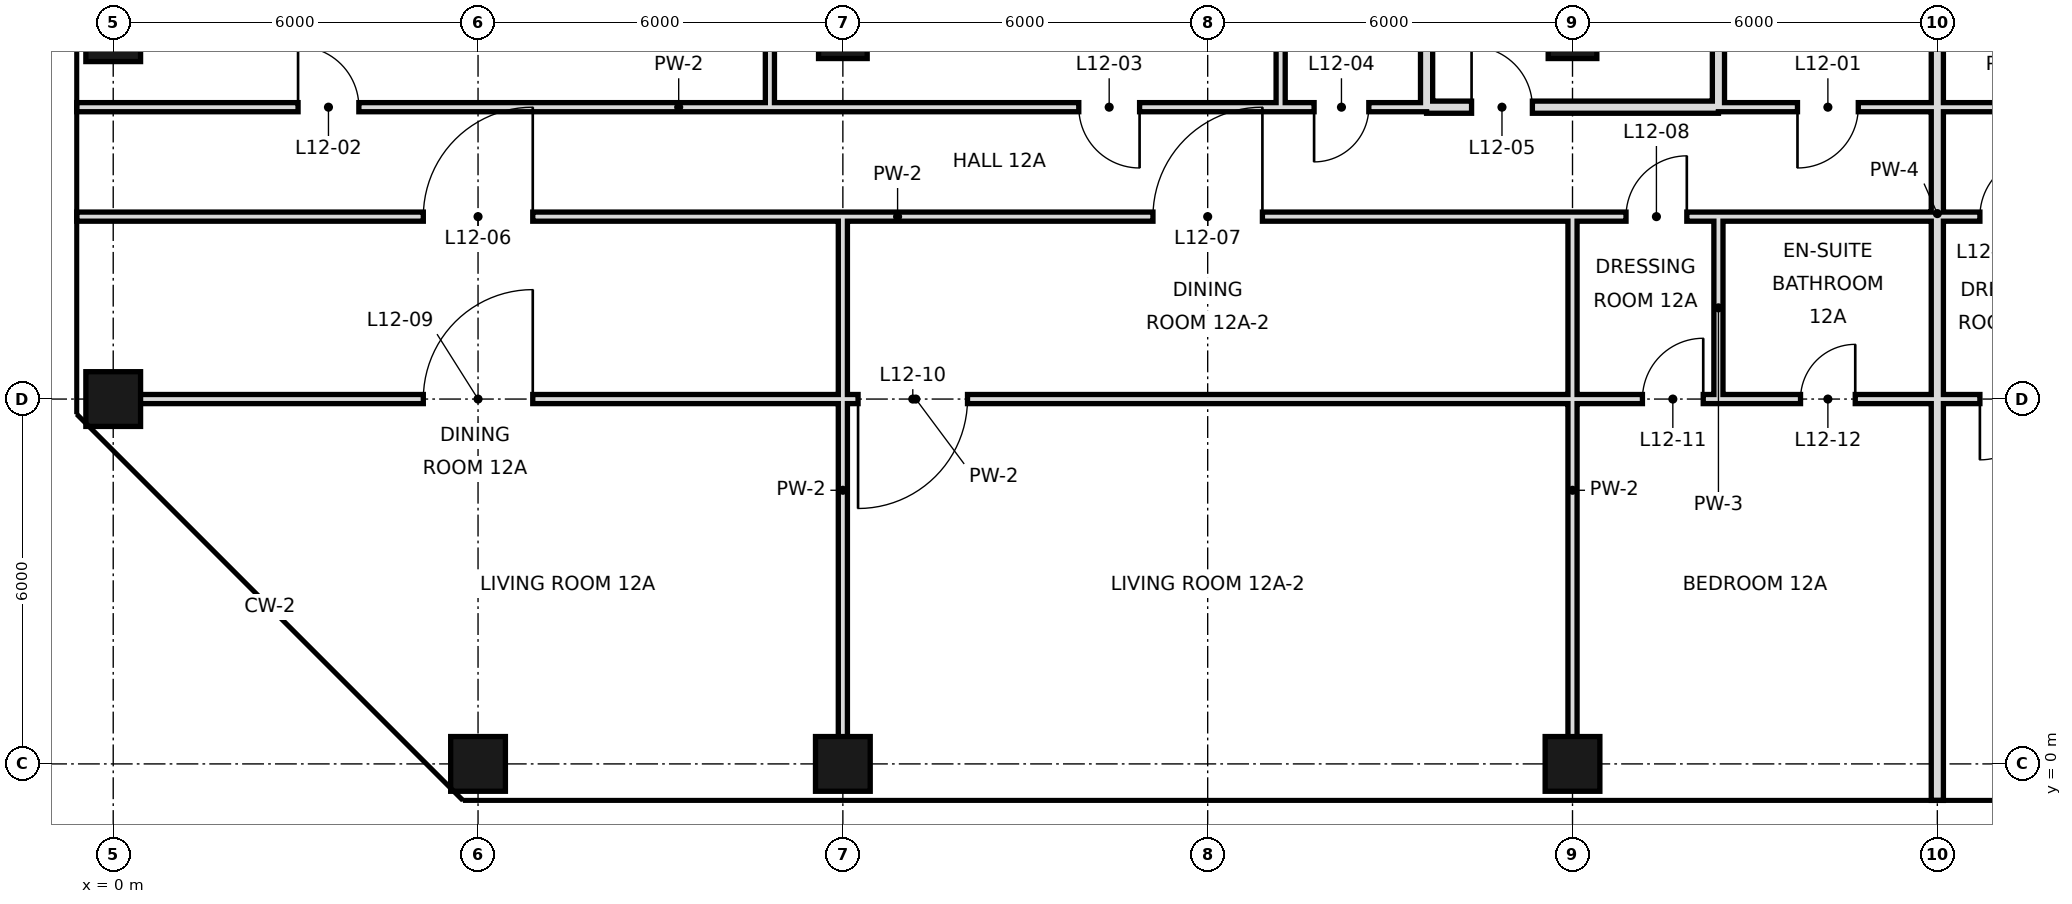
"""IFC4 building model, lengths in metres.
Left out: names, types, materials, properties, quantities, classifications, styles, units other than length and angle.
Written with IfcOpenShell. Run it as: python <this file> out.ifc"""

import sys

from ifc_helpers import new_model, si_unit, direction, frame, frame_2d, origin, origin_2d, place, context, subcontext, project, spatial, rectangle, hollow_rectangle, extrude, element, fill, save


model = new_model("IFC4")
c1 = context("Model", 3, precision=1e-05, world=origin(), true_north=direction((0.0, 1.0)))
c2 = subcontext(c1, "Body", "Model", "MODEL_VIEW")
j1 = project(units=[si_unit("LENGTHUNIT", "METRE"), si_unit("PLANEANGLEUNIT", "RADIAN")], contexts=[c1])
p1 = place(None, origin())
s1 = spatial("IfcSite", under=j1, at=p1, CompositionType="ELEMENT")
p2 = place(p1, origin())
s2 = spatial("IfcBuilding", under=s1, at=p2, CompositionType="ELEMENT")
p3 = place(p2, frame((0.0, 0.0, 64.2)))
s3 = spatial("IfcBuildingStorey", under=s2, at=p3, CompositionType="ELEMENT", Elevation=64.2)
for number, where, z_axis, x_axis in (
    (1, (0.0, 6.0, 0.0), (0.0, 0.0, 1.0), (1.0, 0.0, 0.0)),
    (2, (0.0, 12.0, 0.0), (0.0, 0.0, 1.0), (1.0, 0.0, 0.0)),
    (3, (6.0, 0.0, 0.0), (0.0, 0.0, 1.0), (1.0, 0.0, 0.0)),
    (4, (12.0, 0.0, 0.0), (0.0, 0.0, 1.0), (1.0, 0.0, 0.0)),
):
    element("IfcColumn", number, at=place(p3, frame(where, z_axis=z_axis, x_axis=x_axis)), inside=s3, PredefinedType="COLUMN", context=c2, shape_type="SweptSolid", body=[
        extrude(hollow_rectangle(XDim=0.9, YDim=0.9, WallThickness=0.045, at=origin_2d()), origin(), (0.0, 0.0, 1.0), 3.6),
    ])
p4 = place(p3, frame((12.0, 12.0, 0.0), z_axis=(0.0, 0.0, 1.0), x_axis=(1.0, 0.0, 0.0)))
e5 = element("IfcColumn", 5, at=p4, inside=s3, PredefinedType="COLUMN", context=c2, shape_type="SweptSolid", body=[
    extrude(hollow_rectangle(XDim=0.8, YDim=0.8, WallThickness=0.04, at=origin_2d()), origin(), (0.0, 0.0, 1.0), 3.6),
])
p5 = place(p3, frame((24.0, 0.0, 0.0), z_axis=(0.0, 0.0, 1.0), x_axis=(1.0, 0.0, 0.0)))
e6 = element("IfcColumn", 6, at=p5, inside=s3, PredefinedType="COLUMN", context=c2, shape_type="SweptSolid", body=[
    extrude(hollow_rectangle(XDim=0.9, YDim=0.9, WallThickness=0.045, at=origin_2d()), origin(), (0.0, 0.0, 1.0), 3.6),
])
p6 = place(p3, frame((24.0, 12.0, 0.0), z_axis=(0.0, 0.0, 1.0), x_axis=(1.0, 0.0, 0.0)))
e7 = element("IfcColumn", 7, at=p6, inside=s3, PredefinedType="COLUMN", context=c2, shape_type="SweptSolid", body=[
    extrude(hollow_rectangle(XDim=0.8, YDim=0.8, WallThickness=0.04, at=origin_2d()), origin(), (0.0, 0.0, 1.0), 3.6),
])
p7 = place(p3, frame((10.8, 10.8, 0.0), z_axis=(0.0, 0.0, 1.0), x_axis=(0.0, 1.0, 0.0)))
e8 = element("IfcWall", 8, at=p7, inside=s3, PredefinedType="PARTITIONING", context=c2, shape_type="SweptSolid", body=[
    extrude(rectangle(XDim=7.9, YDim=0.15, at=frame_2d((3.95, 0.0))), origin(), (0.0, 0.0, 1.0), 3.42),
])
p8 = place(p3, frame((12.0, 0.0, 0.0), z_axis=(0.0, 0.0, 1.0), x_axis=(0.0, 1.0, 0.0)))
e9 = element("IfcWall", 9, at=p8, inside=s3, PredefinedType="PARTITIONING", context=c2, shape_type="SweptSolid", body=[
    extrude(rectangle(XDim=9.0, YDim=0.15, at=frame_2d((4.5, 0.0))), origin(), (0.0, 0.0, 1.0), 2.72),
])
p9 = place(p3, frame((19.2, 10.8, 0.0), z_axis=(0.0, 0.0, 1.0), x_axis=(0.0, 1.0, 0.0)))
e10 = element("IfcWall", 10, at=p9, inside=s3, PredefinedType="PARTITIONING", context=c2, shape_type="SweptSolid", body=[
    extrude(rectangle(XDim=7.9, YDim=0.15, at=frame_2d((3.95, 0.0))), origin(), (0.0, 0.0, 1.0), 3.42),
])
p10 = place(p3, frame((21.6, 10.8, 0.0), z_axis=(0.0, 0.0, 1.0), x_axis=(0.0, 1.0, 0.0)))
e11 = element("IfcWall", 11, at=p10, inside=s3, PredefinedType="SOLIDWALL", context=c2, shape_type="SweptSolid", body=[
    extrude(rectangle(XDim=7.9, YDim=0.2, at=frame_2d((3.95, 0.0))), origin(), (0.0, 0.0, 1.0), 2.72),
])
p11 = place(p3, frame((24.0, 0.0, 0.0), z_axis=(0.0, 0.0, 1.0), x_axis=(0.0, 1.0, 0.0)))
e12 = element("IfcWall", 12, at=p11, inside=s3, PredefinedType="PARTITIONING", context=c2, shape_type="SweptSolid", body=[
    extrude(rectangle(XDim=9.0, YDim=0.15, at=frame_2d((4.5, 0.0))), origin(), (0.0, 0.0, 1.0), 2.72),
])
p12 = place(p3, frame((26.4, 10.8, 0.0), z_axis=(0.0, 0.0, 1.0), x_axis=(0.0, 1.0, 0.0)))
e13 = element("IfcWall", 13, at=p12, inside=s3, PredefinedType="SOLIDWALL", context=c2, shape_type="SweptSolid", body=[
    extrude(rectangle(XDim=7.9, YDim=0.2, at=frame_2d((3.95, 0.0))), origin(), (0.0, 0.0, 1.0), 2.72),
])
p13 = place(p3, frame((26.4, 6.0, 0.0), z_axis=(0.0, 0.0, 1.0), x_axis=(0.0, 1.0, 0.0)))
e14 = element("IfcWall", 14, at=p13, inside=s3, PredefinedType="PARTITIONING", context=c2, shape_type="SweptSolid", body=[
    extrude(rectangle(XDim=3.0, YDim=0.15, at=frame_2d((1.5, 0.0))), origin(), (0.0, 0.0, 1.0), 3.42),
])
p14 = place(p3, frame((30.0, -0.6, 0.0), z_axis=(0.0, 0.0, 1.0), x_axis=(0.0, 1.0, 0.0)))
e15 = element("IfcWall", 15, at=p14, inside=s3, PredefinedType="SOLIDWALL", context=c2, shape_type="SweptSolid", body=[
    extrude(rectangle(XDim=19.3, YDim=0.2, at=frame_2d((9.65, 0.0))), origin(), (0.0, 0.0, 1.0), 2.72),
])
p15 = place(p3, frame((21.6, 10.8, 0.0), z_axis=(0.0, 0.0, 1.0), x_axis=(1.0, 0.0, 0.0)))
e16 = element("IfcWall", 16, at=p15, inside=s3, PredefinedType="SOLIDWALL", context=c2, shape_type="SweptSolid", body=[
    extrude(rectangle(XDim=4.8, YDim=0.2, at=frame_2d((2.4, 0.0))), origin(), (0.0, 0.0, 1.0), 2.72),
])
p16 = place(p15, frame((0.74, 0.0, 0.0)))
e17 = element("IfcOpeningElement", 17, at=p16, cuts=e16, PredefinedType="OPENING", context=c2, shape_type="SweptSolid", body=[
    extrude(rectangle(XDim=1.0, YDim=2.4, at=frame_2d((0.5, 1.2))), frame((0.0, 0.11, 0.0), z_axis=(0.0, -1.0, 0.0), x_axis=(1.0, 0.0, 0.0)), (0.0, 0.0, 1.0), 0.22),
])
p17 = place(p3, frame((-0.6, 10.8, 0.0), z_axis=(0.0, 0.0, 1.0), x_axis=(1.0, 0.0, 0.0)))
e18 = element("IfcWall", 18, at=p17, inside=s3, PredefinedType="PARTITIONING", context=c2, shape_type="SweptSolid", body=[
    extrude(rectangle(XDim=19.8, YDim=0.15, at=frame_2d((9.9, 0.0))), origin(), (0.0, 0.0, 1.0), 3.42),
])
p18 = place(p17, frame((3.64, 0.0, 0.0)))
e19 = element("IfcOpeningElement", 19, at=p18, cuts=e18, PredefinedType="OPENING", context=c2, shape_type="SweptSolid", body=[
    extrude(rectangle(XDim=1.0, YDim=2.4, at=frame_2d((0.5, 1.2))), frame((0.0, 0.085, 0.0), z_axis=(0.0, -1.0, 0.0), x_axis=(1.0, 0.0, 0.0)), (0.0, 0.0, 1.0), 0.17),
])
p19 = place(p17, frame((16.48, 0.0, 0.0)))
e20 = element("IfcOpeningElement", 20, at=p19, cuts=e18, PredefinedType="OPENING", context=c2, shape_type="SweptSolid", body=[
    extrude(rectangle(XDim=1.0, YDim=2.4, at=frame_2d((0.5, 1.2))), frame((0.0, 0.085, 0.0), z_axis=(0.0, -1.0, 0.0), x_axis=(1.0, 0.0, 0.0)), (0.0, 0.0, 1.0), 0.17),
])
p20 = place(p3, frame((26.4, 10.8, 0.0), z_axis=(0.0, 0.0, 1.0), x_axis=(1.0, 0.0, 0.0)))
e21 = element("IfcWall", 21, at=p20, inside=s3, PredefinedType="PARTITIONING", context=c2, shape_type="SweptSolid", body=[
    extrude(rectangle(XDim=9.6, YDim=0.15, at=frame_2d((4.8, 0.0))), origin(), (0.0, 0.0, 1.0), 3.42),
])
p21 = place(p20, frame((1.3, 0.0, 0.0)))
e22 = element("IfcOpeningElement", 22, at=p21, cuts=e21, PredefinedType="OPENING", context=c2, shape_type="SweptSolid", body=[
    extrude(rectangle(XDim=1.0, YDim=2.4, at=frame_2d((0.5, 1.2))), frame((0.0, 0.085, 0.0), z_axis=(0.0, -1.0, 0.0), x_axis=(1.0, 0.0, 0.0)), (0.0, 0.0, 1.0), 0.17),
])
p22 = place(p20, frame((7.0, 0.0, 0.0)))
e23 = element("IfcOpeningElement", 23, at=p22, cuts=e21, PredefinedType="OPENING", context=c2, shape_type="SweptSolid", body=[
    extrude(rectangle(XDim=1.0, YDim=2.4, at=frame_2d((0.5, 1.2))), frame((0.0, 0.085, 0.0), z_axis=(0.0, -1.0, 0.0), x_axis=(1.0, 0.0, 0.0)), (0.0, 0.0, 1.0), 0.17),
])
p23 = place(p3, frame((19.2, 10.8, 0.0), z_axis=(0.0, 0.0, 1.0), x_axis=(1.0, 0.0, 0.0)))
e24 = element("IfcWall", 24, at=p23, inside=s3, PredefinedType="PARTITIONING", context=c2, shape_type="SweptSolid", body=[
    extrude(rectangle(XDim=2.4, YDim=0.15, at=frame_2d((1.2, 0.0))), origin(), (0.0, 0.0, 1.0), 3.42),
])
p24 = place(p23, frame((0.55, 0.0, 0.0)))
e25 = element("IfcOpeningElement", 25, at=p24, cuts=e24, PredefinedType="OPENING", context=c2, shape_type="SweptSolid", body=[
    extrude(rectangle(XDim=0.9, YDim=2.4, at=frame_2d((0.45, 1.2))), frame((0.0, 0.085, 0.0), z_axis=(0.0, -1.0, 0.0), x_axis=(1.0, 0.0, 0.0)), (0.0, 0.0, 1.0), 0.17),
])
p25 = place(p3, frame((0.0, 6.0, 0.0), z_axis=(0.0, 0.0, 1.0), x_axis=(1.0, 0.0, 0.0)))
e26 = element("IfcWall", 26, at=p25, inside=s3, PredefinedType="PARTITIONING", context=c2, shape_type="SweptSolid", body=[
    extrude(rectangle(XDim=26.4, YDim=0.15, at=frame_2d((13.2, 0.0))), origin(), (0.0, 0.0, 1.0), 2.97),
])
p26 = place(p25, frame((5.1, 0.0, 0.0)))
e27 = element("IfcOpeningElement", 27, at=p26, cuts=e26, PredefinedType="OPENING", context=c2, shape_type="SweptSolid", body=[
    extrude(rectangle(XDim=1.8, YDim=2.4, at=frame_2d((0.9, 1.2))), frame((0.0, 0.085, 0.0), z_axis=(0.0, -1.0, 0.0), x_axis=(1.0, 0.0, 0.0)), (0.0, 0.0, 1.0), 0.17),
])
p27 = place(p25, frame((12.25, 0.0, 0.0)))
e28 = element("IfcOpeningElement", 28, at=p27, cuts=e26, PredefinedType="OPENING", context=c2, shape_type="SweptSolid", body=[
    extrude(rectangle(XDim=1.8, YDim=2.4, at=frame_2d((0.9, 1.2))), frame((0.0, 0.085, 0.0), z_axis=(0.0, -1.0, 0.0), x_axis=(1.0, 0.0, 0.0)), (0.0, 0.0, 1.0), 0.17),
])
p28 = place(p25, frame((25.15, 0.0, 0.0)))
e29 = element("IfcOpeningElement", 29, at=p28, cuts=e26, PredefinedType="OPENING", context=c2, shape_type="SweptSolid", body=[
    extrude(rectangle(XDim=1.0, YDim=2.4, at=frame_2d((0.5, 1.2))), frame((0.0, 0.085, 0.0), z_axis=(0.0, -1.0, 0.0), x_axis=(1.0, 0.0, 0.0)), (0.0, 0.0, 1.0), 0.17),
])
p29 = place(p3, frame((30.0, 6.0, 0.0), z_axis=(0.0, 0.0, 1.0), x_axis=(1.0, 0.0, 0.0)))
e30 = element("IfcWall", 30, at=p29, inside=s3, PredefinedType="PARTITIONING", context=c2, shape_type="SweptSolid", body=[
    extrude(rectangle(XDim=2.4, YDim=0.15, at=frame_2d((1.2, 0.0))), origin(), (0.0, 0.0, 1.0), 2.97),
])
p30 = place(p29, frame((0.7, 0.0, 0.0)))
e31 = element("IfcOpeningElement", 31, at=p30, cuts=e30, PredefinedType="OPENING", context=c2, shape_type="SweptSolid", body=[
    extrude(rectangle(XDim=1.0, YDim=2.4, at=frame_2d((0.5, 1.2))), frame((0.0, 0.085, 0.0), z_axis=(0.0, -1.0, 0.0), x_axis=(1.0, 0.0, 0.0)), (0.0, 0.0, 1.0), 0.17),
])
p31 = place(p3, frame((26.4, 6.0, 0.0), z_axis=(0.0, 0.0, 1.0), x_axis=(1.0, 0.0, 0.0)))
e32 = element("IfcWall", 32, at=p31, inside=s3, PredefinedType="PARTITIONING", context=c2, shape_type="SweptSolid", body=[
    extrude(rectangle(XDim=3.6, YDim=0.15, at=frame_2d((1.8, 0.0))), origin(), (0.0, 0.0, 1.0), 2.97),
])
p32 = place(p31, frame((1.35, 0.0, 0.0)))
e33 = element("IfcOpeningElement", 33, at=p32, cuts=e32, PredefinedType="OPENING", context=c2, shape_type="SweptSolid", body=[
    extrude(rectangle(XDim=0.9, YDim=2.4, at=frame_2d((0.45, 1.2))), frame((0.0, 0.085, 0.0), z_axis=(0.0, -1.0, 0.0), x_axis=(1.0, 0.0, 0.0)), (0.0, 0.0, 1.0), 0.17),
])
p33 = place(p3, frame((-0.6, 9.0, 0.0), z_axis=(0.0, 0.0, 1.0), x_axis=(1.0, 0.0, 0.0)))
e34 = element("IfcWall", 34, at=p33, inside=s3, PredefinedType="PARTITIONING", context=c2, shape_type="SweptSolid", body=[
    extrude(rectangle(XDim=27.0, YDim=0.15, at=frame_2d((13.5, 0.0))), origin(), (0.0, 0.0, 1.0), 3.42),
])
p34 = place(p33, frame((5.7, 0.0, 0.0)))
e35 = element("IfcOpeningElement", 35, at=p34, cuts=e34, PredefinedType="OPENING", context=c2, shape_type="SweptSolid", body=[
    extrude(rectangle(XDim=1.8, YDim=2.4, at=frame_2d((0.9, 1.2))), frame((0.0, 0.085, 0.0), z_axis=(0.0, -1.0, 0.0), x_axis=(1.0, 0.0, 0.0)), (0.0, 0.0, 1.0), 0.17),
])
p35 = place(p33, frame((17.7, 0.0, 0.0)))
e36 = element("IfcOpeningElement", 36, at=p35, cuts=e34, PredefinedType="OPENING", context=c2, shape_type="SweptSolid", body=[
    extrude(rectangle(XDim=1.8, YDim=2.4, at=frame_2d((0.9, 1.2))), frame((0.0, 0.085, 0.0), z_axis=(0.0, -1.0, 0.0), x_axis=(1.0, 0.0, 0.0)), (0.0, 0.0, 1.0), 0.17),
])
p36 = place(p33, frame((25.48, 0.0, 0.0)))
e37 = element("IfcOpeningElement", 37, at=p36, cuts=e34, PredefinedType="OPENING", context=c2, shape_type="SweptSolid", body=[
    extrude(rectangle(XDim=1.0, YDim=2.4, at=frame_2d((0.5, 1.2))), frame((0.0, 0.085, 0.0), z_axis=(0.0, -1.0, 0.0), x_axis=(1.0, 0.0, 0.0)), (0.0, 0.0, 1.0), 0.17),
])
p37 = place(p3, frame((30.0, 9.0, 0.0), z_axis=(0.0, 0.0, 1.0), x_axis=(1.0, 0.0, 0.0)))
e38 = element("IfcWall", 38, at=p37, inside=s3, PredefinedType="PARTITIONING", context=c2, shape_type="SweptSolid", body=[
    extrude(rectangle(XDim=2.4, YDim=0.15, at=frame_2d((1.2, 0.0))), origin(), (0.0, 0.0, 1.0), 3.42),
])
p38 = place(p37, frame((0.7, 0.0, 0.0)))
e39 = element("IfcOpeningElement", 39, at=p38, cuts=e38, PredefinedType="OPENING", context=c2, shape_type="SweptSolid", body=[
    extrude(rectangle(XDim=1.0, YDim=2.4, at=frame_2d((0.5, 1.2))), frame((0.0, 0.085, 0.0), z_axis=(0.0, -1.0, 0.0), x_axis=(1.0, 0.0, 0.0)), (0.0, 0.0, 1.0), 0.17),
])
p39 = place(p3, frame((26.4, 9.0, 0.0), z_axis=(0.0, 0.0, 1.0), x_axis=(1.0, 0.0, 0.0)))
e40 = element("IfcWall", 40, at=p39, inside=s3, PredefinedType="PARTITIONING", context=c2, shape_type="SweptSolid", body=[
    extrude(rectangle(XDim=3.6, YDim=0.15, at=frame_2d((1.8, 0.0))), origin(), (0.0, 0.0, 1.0), 3.42),
])
p40 = place(p21, frame((1.0, 0.0, 0.0), z_axis=(0.0, 0.0, 1.0), x_axis=(-1.0, 0.0, 0.0)))
e41 = element("IfcDoor", 41, at=p40, inside=s3, OperationType="SINGLE_SWING_RIGHT", PredefinedType="DOOR", context=c2, shape_type="SweptSolid", body=[
    extrude(rectangle(XDim=1.0, YDim=2.4, at=frame_2d((0.5, 1.2))), frame((0.0, 0.025, 0.0), z_axis=(0.0, -1.0, 0.0), x_axis=(1.0, 0.0, 0.0)), (0.0, 0.0, 1.0), 0.05),
])
fill(e22, e41)
p41 = place(p18, origin())
e42 = element("IfcDoor", 42, at=p41, inside=s3, OperationType="SINGLE_SWING_LEFT", PredefinedType="DOOR", context=c2, shape_type="SweptSolid", body=[
    extrude(rectangle(XDim=1.0, YDim=2.4, at=frame_2d((0.5, 1.2))), frame((0.0, 0.025, 0.0), z_axis=(0.0, -1.0, 0.0), x_axis=(1.0, 0.0, 0.0)), (0.0, 0.0, 1.0), 0.05),
])
fill(e19, e42)
p42 = place(p19, origin())
e43 = element("IfcDoor", 43, at=p42, inside=s3, OperationType="SINGLE_SWING_RIGHT", PredefinedType="DOOR", context=c2, shape_type="SweptSolid", body=[
    extrude(rectangle(XDim=1.0, YDim=2.4, at=frame_2d((0.5, 1.2))), frame((0.0, 0.025, 0.0), z_axis=(0.0, -1.0, 0.0), x_axis=(1.0, 0.0, 0.0)), (0.0, 0.0, 1.0), 0.05),
])
fill(e20, e43)
p43 = place(p24, frame((0.9, 0.0, 0.0), z_axis=(0.0, 0.0, 1.0), x_axis=(-1.0, 0.0, 0.0)))
e44 = element("IfcDoor", 44, at=p43, inside=s3, OperationType="SINGLE_SWING_RIGHT", PredefinedType="DOOR", context=c2, shape_type="SweptSolid", body=[
    extrude(rectangle(XDim=0.9, YDim=2.4, at=frame_2d((0.45, 1.2))), frame((0.0, 0.025, 0.0), z_axis=(0.0, -1.0, 0.0), x_axis=(1.0, 0.0, 0.0)), (0.0, 0.0, 1.0), 0.05),
])
fill(e25, e44)
p44 = place(p16, origin())
e45 = element("IfcDoor", 45, at=p44, inside=s3, OperationType="SINGLE_SWING_LEFT", PredefinedType="DOOR", context=c2, shape_type="SweptSolid", body=[
    extrude(rectangle(XDim=1.0, YDim=2.4, at=frame_2d((0.5, 1.2))), frame((0.0, 0.025, 0.0), z_axis=(0.0, -1.0, 0.0), x_axis=(1.0, 0.0, 0.0)), (0.0, 0.0, 1.0), 0.05),
])
fill(e17, e45)
p45 = place(p34, frame((1.8, 0.0, 0.0), z_axis=(0.0, 0.0, 1.0), x_axis=(-1.0, 0.0, 0.0)))
e46 = element("IfcDoor", 46, at=p45, inside=s3, OperationType="SINGLE_SWING_LEFT", PredefinedType="DOOR", context=c2, shape_type="SweptSolid", body=[
    extrude(rectangle(XDim=1.8, YDim=2.4, at=frame_2d((0.9, 1.2))), frame((0.0, 0.025, 0.0), z_axis=(0.0, -1.0, 0.0), x_axis=(1.0, 0.0, 0.0)), (0.0, 0.0, 1.0), 0.05),
])
fill(e35, e46)
p46 = place(p35, frame((1.8, 0.0, 0.0), z_axis=(0.0, 0.0, 1.0), x_axis=(-1.0, 0.0, 0.0)))
e47 = element("IfcDoor", 47, at=p46, inside=s3, OperationType="SINGLE_SWING_LEFT", PredefinedType="DOOR", context=c2, shape_type="SweptSolid", body=[
    extrude(rectangle(XDim=1.8, YDim=2.4, at=frame_2d((0.9, 1.2))), frame((0.0, 0.025, 0.0), z_axis=(0.0, -1.0, 0.0), x_axis=(1.0, 0.0, 0.0)), (0.0, 0.0, 1.0), 0.05),
])
fill(e36, e47)
p47 = place(p36, frame((1.0, 0.0, 0.0), z_axis=(0.0, 0.0, 1.0), x_axis=(-1.0, 0.0, 0.0)))
e48 = element("IfcDoor", 48, at=p47, inside=s3, OperationType="SINGLE_SWING_LEFT", PredefinedType="DOOR", context=c2, shape_type="SweptSolid", body=[
    extrude(rectangle(XDim=1.0, YDim=2.4, at=frame_2d((0.5, 1.2))), frame((0.0, 0.025, 0.0), z_axis=(0.0, -1.0, 0.0), x_axis=(1.0, 0.0, 0.0)), (0.0, 0.0, 1.0), 0.05),
])
fill(e37, e48)
p48 = place(p26, frame((1.8, 0.0, 0.0), z_axis=(0.0, 0.0, 1.0), x_axis=(-1.0, 0.0, 0.0)))
e49 = element("IfcDoor", 49, at=p48, inside=s3, OperationType="SINGLE_SWING_LEFT", PredefinedType="DOOR", context=c2, shape_type="SweptSolid", body=[
    extrude(rectangle(XDim=1.8, YDim=2.4, at=frame_2d((0.9, 1.2))), frame((0.0, 0.025, 0.0), z_axis=(0.0, -1.0, 0.0), x_axis=(1.0, 0.0, 0.0)), (0.0, 0.0, 1.0), 0.05),
])
fill(e27, e49)
p49 = place(p27, frame((1.8, 0.0, 0.0), z_axis=(0.0, 0.0, 1.0), x_axis=(-1.0, 0.0, 0.0)))
e50 = element("IfcDoor", 50, at=p49, inside=s3, OperationType="SINGLE_SWING_RIGHT", PredefinedType="DOOR", context=c2, shape_type="SweptSolid", body=[
    extrude(rectangle(XDim=1.8, YDim=2.4, at=frame_2d((0.9, 1.2))), frame((0.0, 0.025, 0.0), z_axis=(0.0, -1.0, 0.0), x_axis=(1.0, 0.0, 0.0)), (0.0, 0.0, 1.0), 0.05),
])
fill(e28, e50)
p50 = place(p28, frame((1.0, 0.0, 0.0), z_axis=(0.0, 0.0, 1.0), x_axis=(-1.0, 0.0, 0.0)))
e51 = element("IfcDoor", 51, at=p50, inside=s3, OperationType="SINGLE_SWING_LEFT", PredefinedType="DOOR", context=c2, shape_type="SweptSolid", body=[
    extrude(rectangle(XDim=1.0, YDim=2.4, at=frame_2d((0.5, 1.2))), frame((0.0, 0.025, 0.0), z_axis=(0.0, -1.0, 0.0), x_axis=(1.0, 0.0, 0.0)), (0.0, 0.0, 1.0), 0.05),
])
fill(e29, e51)
p51 = place(p32, frame((0.9, 0.0, 0.0), z_axis=(0.0, 0.0, 1.0), x_axis=(-1.0, 0.0, 0.0)))
e52 = element("IfcDoor", 52, at=p51, inside=s3, OperationType="SINGLE_SWING_LEFT", PredefinedType="DOOR", context=c2, shape_type="SweptSolid", body=[
    extrude(rectangle(XDim=0.9, YDim=2.4, at=frame_2d((0.45, 1.2))), frame((0.0, 0.025, 0.0), z_axis=(0.0, -1.0, 0.0), x_axis=(1.0, 0.0, 0.0)), (0.0, 0.0, 1.0), 0.05),
])
fill(e33, e52)
p52 = place(p38, frame((1.0, 0.0, 0.0), z_axis=(0.0, 0.0, 1.0), x_axis=(-1.0, 0.0, 0.0)))
e53 = element("IfcDoor", 53, at=p52, inside=s3, OperationType="SINGLE_SWING_LEFT", PredefinedType="DOOR", context=c2, shape_type="SweptSolid", body=[
    extrude(rectangle(XDim=1.0, YDim=2.4, at=frame_2d((0.5, 1.2))), frame((0.0, 0.025, 0.0), z_axis=(0.0, -1.0, 0.0), x_axis=(1.0, 0.0, 0.0)), (0.0, 0.0, 1.0), 0.05),
])
fill(e39, e53)
p53 = place(p30, frame((1.0, 0.0, 0.0), z_axis=(0.0, 0.0, 1.0), x_axis=(-1.0, 0.0, 0.0)))
e54 = element("IfcDoor", 54, at=p53, inside=s3, OperationType="SINGLE_SWING_RIGHT", PredefinedType="DOOR", context=c2, shape_type="SweptSolid", body=[
    extrude(rectangle(XDim=1.0, YDim=2.4, at=frame_2d((0.5, 1.2))), frame((0.0, 0.025, 0.0), z_axis=(0.0, -1.0, 0.0), x_axis=(1.0, 0.0, 0.0)), (0.0, 0.0, 1.0), 0.05),
])
fill(e31, e54)
save(model, sys.argv[1])
